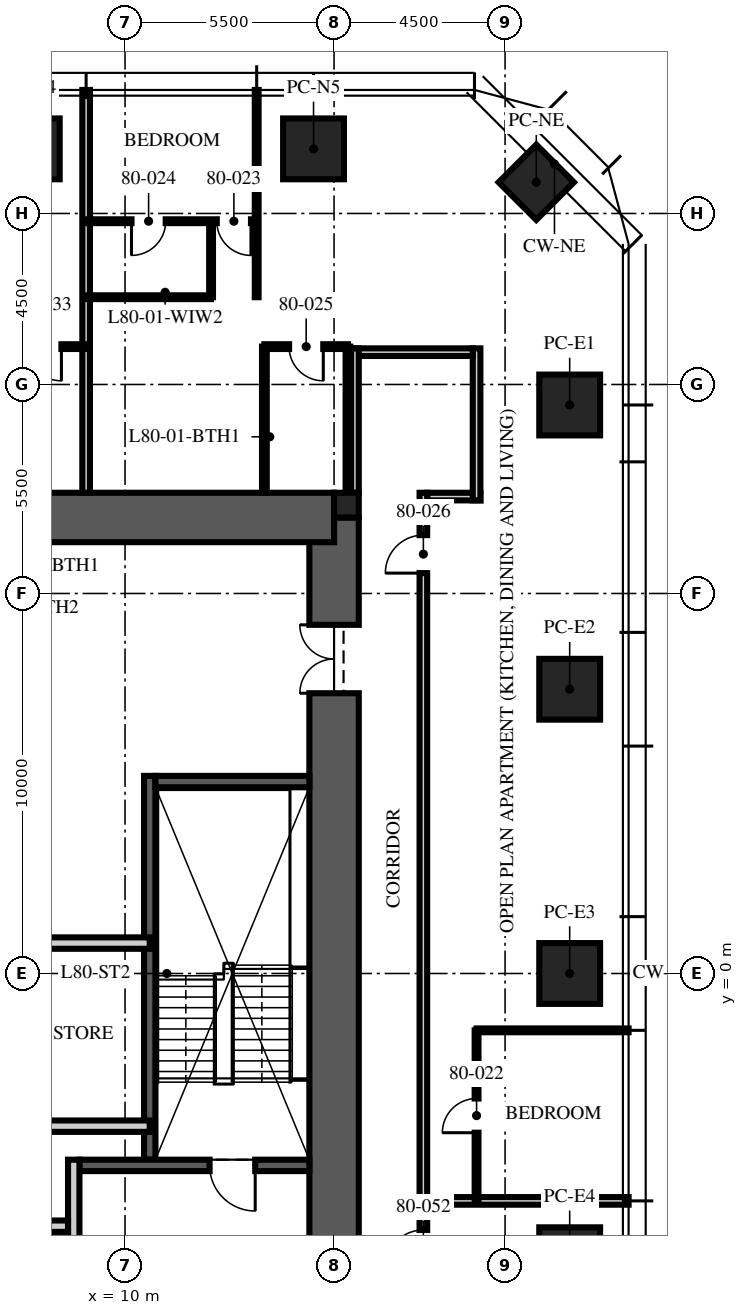
"""IFC4 building model, lengths in metres.
Left out: names, types, materials, properties, quantities, classifications, styles, units other than length and angle.
Written with IfcOpenShell. Run it as: python <this file> out.ifc"""

import sys

from ifc_helpers import new_model, si_unit, direction, frame, frame_2d, origin, origin_2d, place, context, subcontext, project, spatial, rectangle, extrude, element, fill, save


model = new_model("IFC4")
c1 = context("Model", 3, precision=1e-05, world=origin(), true_north=direction((0.0, 1.0)))
c2 = subcontext(c1, "Body", "Model", "MODEL_VIEW")
j1 = project(units=[si_unit("LENGTHUNIT", "METRE"), si_unit("PLANEANGLEUNIT", "RADIAN")], contexts=[c1])
p1 = place(None, origin())
s1 = spatial("IfcSite", under=j1, at=p1, CompositionType="ELEMENT")
p2 = place(p1, origin())
s2 = spatial("IfcBuilding", under=s1, at=p2, CompositionType="ELEMENT")
p3 = place(p2, frame((0.0, 0.0, 319.5)))
s3 = spatial("IfcBuildingStorey", under=s2, at=p3, CompositionType="ELEMENT", Elevation=319.5)
p4 = place(p3, frame((15.5, -12.0, -0.25), z_axis=(0.0, 0.0, 1.0), x_axis=(0.0, 1.0, 0.0)))
e1 = element("IfcWall", 1, at=p4, inside=s3, PredefinedType="SHEAR", context=c2, shape_type="SweptSolid", body=[
    extrude(rectangle(XDim=24.0, YDim=1.3, at=frame_2d((12.0, 0.0))), origin(), (0.0, 0.0, 1.0), 3.75),
])
p5 = place(p4, frame((3.125, 0.0, 0.25)))
e2 = element("IfcOpeningElement", 2, at=p5, cuts=e1, PredefinedType="OPENING", context=c2, shape_type="SweptSolid", body=[
    extrude(rectangle(XDim=1.2, YDim=2.1, at=frame_2d((0.6, 1.05))), frame((0.0, 0.66, 0.0), z_axis=(0.0, -1.0, 0.0), x_axis=(1.0, 0.0, 0.0)), (0.0, 0.0, 1.0), 1.32),
])
p6 = place(p4, frame((19.375, 0.0, 0.25)))
e3 = element("IfcOpeningElement", 3, at=p6, cuts=e1, PredefinedType="OPENING", context=c2, shape_type="SweptSolid", body=[
    extrude(rectangle(XDim=1.8, YDim=2.1, at=frame_2d((0.9, 1.05))), frame((0.0, 0.66, 0.0), z_axis=(0.0, -1.0, 0.0), x_axis=(1.0, 0.0, 0.0)), (0.0, 0.0, 1.0), 1.32),
])
p7 = place(p3, frame((-15.5, 12.0, -0.25), z_axis=(0.0, 0.0, 1.0), x_axis=(1.0, 0.0, 0.0)))
e4 = element("IfcWall", 4, at=p7, inside=s3, PredefinedType="SHEAR", context=c2, shape_type="SweptSolid", body=[
    extrude(rectangle(XDim=31.0, YDim=1.3, at=frame_2d((15.5, 0.0))), origin(), (0.0, 0.0, 1.0), 3.75),
])
p8 = place(p3, frame((15.825, 12.325, -0.25), z_axis=(0.0, 0.0, 1.0), x_axis=(1.0, 0.0, 0.0)))
e5 = element("IfcColumn", 5, at=p8, inside=s3, PredefinedType="COLUMN", context=c2, shape_type="SweptSolid", body=[
    extrude(rectangle(XDim=0.65, YDim=0.65, at=origin_2d()), origin(), (0.0, 0.0, 1.0), 3.75),
])
for number, where, z_axis, x_axis in (
    (6, (7.48, 21.7, 0.0), (0.0, 0.0, 1.0), (1.0, 0.0, 0.0)),
    (7, (14.96, 21.7, 0.0), (0.0, 0.0, 1.0), (1.0, 0.0, 0.0)),
    (8, (21.7, 14.96, 0.0), (0.0, 0.0, 1.0), (0.0, 1.0, 0.0)),
    (9, (21.7, 7.48, 0.0), (0.0, 0.0, 1.0), (0.0, 1.0, 0.0)),
    (10, (21.7, 0.0, 0.0), (0.0, 0.0, 1.0), (0.0, 1.0, 0.0)),
    (11, (21.7, -7.48, 0.0), (0.0, 0.0, 1.0), (0.0, 1.0, 0.0)),
):
    element("IfcColumn", number, at=place(p3, frame(where, z_axis=z_axis, x_axis=x_axis)), inside=s3, PredefinedType="COLUMN", context=c2, shape_type="SweptSolid", body=[
        extrude(rectangle(XDim=1.6, YDim=1.6, at=origin_2d()), origin(), (0.0, 0.0, 1.0), 3.75),
    ])
p9 = place(p3, frame((20.821, 20.821, 0.0), z_axis=(0.0, 0.0, 1.0), x_axis=(0.707106781187, -0.707106781187, 0.0)))
e12 = element("IfcColumn", 12, at=p9, inside=s3, PredefinedType="COLUMN", context=c2, shape_type="SweptSolid", body=[
    extrude(rectangle(XDim=1.4, YDim=1.4, at=origin_2d()), origin(), (0.0, 0.0, 1.0), 3.75),
])
p10 = place(p3, frame((10.65, -4.9, 0.0), z_axis=(0.0, 0.0, 1.0), x_axis=(0.0, 1.0, 0.0)))
e13 = element("IfcWall", 13, at=p10, inside=s3, PredefinedType="SOLIDWALL", context=c2, shape_type="SweptSolid", body=[
    extrude(rectangle(XDim=10.1, YDim=0.3, at=frame_2d((5.05, 0.0))), origin(), (0.0, 0.0, 1.0), 3.5),
])
p11 = place(p3, frame((14.85, -5.05, 0.0), z_axis=(0.0, 0.0, 1.0), x_axis=(-1.0, 0.0, 0.0)))
e14 = element("IfcWall", 14, at=p11, inside=s3, PredefinedType="SOLIDWALL", context=c2, shape_type="SweptSolid", body=[
    extrude(rectangle(XDim=6.05, YDim=0.3, at=frame_2d((3.025, 0.0))), origin(), (0.0, 0.0, 1.0), 3.5),
])
p12 = place(p11, frame((1.425, 0.0, 0.0)))
e15 = element("IfcOpeningElement", 15, at=p12, cuts=e14, PredefinedType="OPENING", context=c2, shape_type="SweptSolid", body=[
    extrude(rectangle(XDim=1.2, YDim=2.1, at=frame_2d((0.6, 1.05))), frame((0.0, 0.16, 0.0), z_axis=(0.0, -1.0, 0.0), x_axis=(1.0, 0.0, 0.0)), (0.0, 0.0, 1.0), 0.32),
])
p13 = place(p3, frame((14.85, 5.05, 0.0), z_axis=(0.0, 0.0, 1.0), x_axis=(-1.0, 0.0, 0.0)))
e16 = element("IfcWall", 16, at=p13, inside=s3, PredefinedType="SOLIDWALL", context=c2, shape_type="SweptSolid", body=[
    extrude(rectangle(XDim=4.05, YDim=0.3, at=frame_2d((2.025, 0.0))), origin(), (0.0, 0.0, 1.0), 3.5),
])
p14 = place(p3, frame((8.65, -11.35, 0.0), z_axis=(0.0, 0.0, 1.0), x_axis=(0.0, 1.0, 0.0)))
e17 = element("IfcWall", 17, at=p14, inside=s3, PredefinedType="PARTITIONING", context=c2, shape_type="SweptSolid", body=[
    extrude(rectangle(XDim=6.45, YDim=0.3, at=frame_2d((3.225, 0.0))), origin(), (0.0, 0.0, 1.0), 3.5),
])
p15 = place(p14, frame((2.6, 0.0, 0.0)))
e18 = element("IfcOpeningElement", 18, at=p15, cuts=e17, PredefinedType="OPENING", context=c2, shape_type="SweptSolid", body=[
    extrude(rectangle(XDim=1.1, YDim=2.1, at=frame_2d((0.55, 1.05))), frame((0.0, 0.16, 0.0), z_axis=(0.0, -1.0, 0.0), x_axis=(1.0, 0.0, 0.0)), (0.0, 0.0, 1.0), 0.32),
])
p16 = place(p3, frame((-8.5, -6.65, 0.0), z_axis=(0.0, 0.0, 1.0), x_axis=(1.0, 0.0, 0.0)))
e19 = element("IfcWall", 19, at=p16, inside=s3, PredefinedType="PARTITIONING", context=c2, shape_type="SweptSolid", body=[
    extrude(rectangle(XDim=17.0, YDim=0.3, at=frame_2d((8.5, 0.0))), origin(), (0.0, 0.0, 1.0), 3.5),
])
p17 = place(p16, frame((7.8, 0.0, 0.0)))
e20 = element("IfcOpeningElement", 20, at=p17, cuts=e19, PredefinedType="OPENING", context=c2, shape_type="SweptSolid", body=[
    extrude(rectangle(XDim=1.3, YDim=2.4, at=frame_2d((0.65, 1.2))), frame((0.0, 0.16, 0.0), z_axis=(0.0, -1.0, 0.0), x_axis=(1.0, 0.0, 0.0)), (0.0, 0.0, 1.0), 0.32),
])
p18 = place(p16, frame((5.65, 0.0, 0.0)))
e21 = element("IfcOpeningElement", 21, at=p18, cuts=e19, PredefinedType="OPENING", context=c2, shape_type="SweptSolid", body=[
    extrude(rectangle(XDim=0.9, YDim=2.1, at=frame_2d((0.45, 1.05))), frame((0.0, 0.16, 0.0), z_axis=(0.0, -1.0, 0.0), x_axis=(1.0, 0.0, 0.0)), (0.0, 0.0, 1.0), 0.32),
])
p19 = place(p16, frame((10.4, 0.0, 0.0)))
e22 = element("IfcOpeningElement", 22, at=p19, cuts=e19, PredefinedType="OPENING", context=c2, shape_type="SweptSolid", body=[
    extrude(rectangle(XDim=0.9, YDim=2.1, at=frame_2d((0.45, 1.05))), frame((0.0, 0.16, 0.0), z_axis=(0.0, -1.0, 0.0), x_axis=(1.0, 0.0, 0.0)), (0.0, 0.0, 1.0), 0.32),
])
p20 = place(p3, frame((-10.65, 0.8, 0.0), z_axis=(0.0, 0.0, 1.0), x_axis=(1.0, 0.0, 0.0)))
e23 = element("IfcWall", 23, at=p20, inside=s3, PredefinedType="PARTITIONING", context=c2, shape_type="SweptSolid", body=[
    extrude(rectangle(XDim=21.3, YDim=0.3, at=frame_2d((10.65, 0.0))), origin(), (0.0, 0.0, 1.0), 3.5),
])
p21 = place(p20, frame((10.05, 0.0, 0.0)))
e24 = element("IfcOpeningElement", 24, at=p21, cuts=e23, PredefinedType="OPENING", context=c2, shape_type="SweptSolid", body=[
    extrude(rectangle(XDim=1.2, YDim=2.1, at=frame_2d((0.6, 1.05))), frame((0.0, 0.16, 0.0), z_axis=(0.0, -1.0, 0.0), x_axis=(1.0, 0.0, 0.0)), (0.0, 0.0, 1.0), 0.32),
])
p22 = place(p20, frame((0.793, 0.0, 0.0)))
e25 = element("IfcOpeningElement", 25, at=p22, cuts=e23, PredefinedType="OPENING", context=c2, shape_type="SweptSolid", body=[
    extrude(rectangle(XDim=0.9, YDim=2.1, at=frame_2d((0.45, 1.05))), frame((0.0, 0.16, 0.0), z_axis=(0.0, -1.0, 0.0), x_axis=(1.0, 0.0, 0.0)), (0.0, 0.0, 1.0), 0.32),
])
p23 = place(p3, frame((10.65, -4.018, 0.0), z_axis=(0.0, 0.0, 1.0), x_axis=(-1.0, 0.0, 0.0)))
e26 = element("IfcWall", 26, at=p23, inside=s3, PredefinedType="PARTITIONING", context=c2, shape_type="SweptSolid", body=[
    extrude(rectangle(XDim=6.45, YDim=0.3, at=frame_2d((3.225, 0.0))), origin(), (0.0, 0.0, 1.0), 3.5),
])
p24 = place(p3, frame((17.95, 12.55, 0.0), z_axis=(0.0, 0.0, 1.0), x_axis=(1.0, 0.0, 0.0)))
e27 = element("IfcWall", 27, at=p24, inside=s3, PredefinedType="PARTITIONING", context=c2, shape_type="SweptSolid", body=[
    extrude(rectangle(XDim=1.4, YDim=0.2, at=frame_2d((0.7, 0.0))), origin(), (0.0, 0.0, 1.0), 3.5),
])
p25 = place(p3, frame((19.25, 12.45, 0.0), z_axis=(0.0, 0.0, 1.0), x_axis=(0.0, 1.0, 0.0)))
e28 = element("IfcWall", 28, at=p25, inside=s3, PredefinedType="PARTITIONING", context=c2, shape_type="SweptSolid", body=[
    extrude(rectangle(XDim=4.0, YDim=0.2, at=frame_2d((2.0, 0.0))), origin(), (0.0, 0.0, 1.0), 2.9),
])
p26 = place(p3, frame((19.15, 16.35, 0.0), z_axis=(0.0, 0.0, 1.0), x_axis=(-1.0, 0.0, 0.0)))
e29 = element("IfcWall", 29, at=p26, inside=s3, PredefinedType="PARTITIONING", context=c2, shape_type="SweptSolid", body=[
    extrude(rectangle(XDim=3.2, YDim=0.2, at=frame_2d((1.6, 0.0))), origin(), (0.0, 0.0, 1.0), 2.6),
])
p27 = place(p3, frame((16.05, 16.45, 0.0), z_axis=(0.0, 0.0, 1.0), x_axis=(0.0, -1.0, 0.0)))
e30 = element("IfcWall", 30, at=p27, inside=s3, PredefinedType="PARTITIONING", context=c2, shape_type="SweptSolid", body=[
    extrude(rectangle(XDim=3.8, YDim=0.2, at=frame_2d((1.9, 0.0))), origin(), (0.0, 0.0, 1.0), 2.6),
])
p28 = place(p3, frame((17.95, -5.984, 0.0), z_axis=(0.0, 0.0, 1.0), x_axis=(1.0, 0.0, 0.0)))
e31 = element("IfcWall", 31, at=p28, inside=s3, PredefinedType="PARTITIONING", context=c2, shape_type="SweptSolid", body=[
    extrude(rectangle(XDim=5.3, YDim=0.2, at=frame_2d((2.65, 0.0))), origin(), (0.0, 0.0, 1.0), 3.01),
])
p29 = place(p3, frame((19.25, -1.496, 0.0), z_axis=(0.0, 0.0, 1.0), x_axis=(1.0, 0.0, 0.0)))
e32 = element("IfcWall", 32, at=p29, inside=s3, PredefinedType="PARTITIONING", context=c2, shape_type="SweptSolid", body=[
    extrude(rectangle(XDim=4.0, YDim=0.1, at=frame_2d((2.0, 0.0))), origin(), (0.0, 0.0, 1.0), 3.01),
])
p30 = place(p3, frame((13.464, 17.796, 0.0), z_axis=(0.0, 0.0, 1.0), x_axis=(0.0, 1.0, 0.0)))
e33 = element("IfcWall", 33, at=p30, inside=s3, PredefinedType="PARTITIONING", context=c2, shape_type="SweptSolid", body=[
    extrude(rectangle(XDim=5.454, YDim=0.1, at=frame_2d((2.727, 0.0))), origin(), (0.0, 0.0, 1.0), 3.01),
])
p31 = place(p3, frame((8.976, 12.65, 0.0), z_axis=(0.0, 0.0, 1.0), x_axis=(0.0, 1.0, 0.0)))
e34 = element("IfcWall", 34, at=p31, inside=s3, PredefinedType="PARTITIONING", context=c2, shape_type="SweptSolid", body=[
    extrude(rectangle(XDim=10.6, YDim=0.2, at=frame_2d((5.3, 0.0))), origin(), (0.0, 0.0, 1.0), 3.01),
])
p32 = place(p3, frame((19.25, -5.984, 0.0), z_axis=(0.0, 0.0, 1.0), x_axis=(0.0, 1.0, 0.0)))
e35 = element("IfcWall", 35, at=p32, inside=s3, PredefinedType="PARTITIONING", context=c2, shape_type="SweptSolid", body=[
    extrude(rectangle(XDim=4.488, YDim=0.1, at=frame_2d((2.244, 0.0))), origin(), (0.0, 0.0, 1.0), 2.91),
])
p33 = place(p32, frame((1.794, 0.0, 0.0)))
e36 = element("IfcOpeningElement", 36, at=p33, cuts=e35, PredefinedType="OPENING", context=c2, shape_type="SweptSolid", body=[
    extrude(rectangle(XDim=0.9, YDim=2.1, at=frame_2d((0.45, 1.05))), frame((0.0, 0.06, 0.0), z_axis=(0.0, -1.0, 0.0), x_axis=(1.0, 0.0, 0.0)), (0.0, 0.0, 1.0), 0.12),
])
p34 = place(p3, frame((13.464, 19.796, 0.0), z_axis=(0.0, 0.0, 1.0), x_axis=(-1.0, 0.0, 0.0)))
e37 = element("IfcWall", 37, at=p34, inside=s3, PredefinedType="PARTITIONING", context=c2, shape_type="SweptSolid", body=[
    extrude(rectangle(XDim=4.488, YDim=0.1, at=frame_2d((2.244, 0.0))), origin(), (0.0, 0.0, 1.0), 2.91),
])
p35 = place(p34, frame((0.15, 0.0, 0.0)))
e38 = element("IfcOpeningElement", 38, at=p35, cuts=e37, PredefinedType="OPENING", context=c2, shape_type="SweptSolid", body=[
    extrude(rectangle(XDim=0.9, YDim=2.1, at=frame_2d((0.45, 1.05))), frame((0.0, 0.06, 0.0), z_axis=(0.0, -1.0, 0.0), x_axis=(1.0, 0.0, 0.0)), (0.0, 0.0, 1.0), 0.12),
])
p36 = place(p34, frame((2.394, 0.0, 0.0)))
e39 = element("IfcOpeningElement", 39, at=p36, cuts=e37, PredefinedType="OPENING", context=c2, shape_type="SweptSolid", body=[
    extrude(rectangle(XDim=0.9, YDim=2.1, at=frame_2d((0.45, 1.05))), frame((0.0, 0.06, 0.0), z_axis=(0.0, -1.0, 0.0), x_axis=(1.0, 0.0, 0.0)), (0.0, 0.0, 1.0), 0.12),
])
p37 = place(p3, frame((12.264, 17.796, 0.0), z_axis=(0.0, 0.0, 1.0), x_axis=(0.0, 1.0, 0.0)))
e40 = element("IfcWall", 40, at=p37, inside=s3, PredefinedType="PARTITIONING", context=c2, shape_type="SweptSolid", body=[
    extrude(rectangle(XDim=2.0, YDim=0.1, at=frame_2d((1.0, 0.0))), origin(), (0.0, 0.0, 1.0), 3.5),
])
p38 = place(p3, frame((12.264, 17.796, 0.0), z_axis=(0.0, 0.0, 1.0), x_axis=(-1.0, 0.0, 0.0)))
e41 = element("IfcWall", 41, at=p38, inside=s3, PredefinedType="PARTITIONING", context=c2, shape_type="SweptSolid", body=[
    extrude(rectangle(XDim=3.288, YDim=0.1, at=frame_2d((1.644, 0.0))), origin(), (0.0, 0.0, 1.0), 2.91),
])
p39 = place(p3, frame((15.866, 16.496, 0.0), z_axis=(0.0, 0.0, 1.0), x_axis=(-1.0, 0.0, 0.0)))
e42 = element("IfcWall", 42, at=p39, inside=s3, PredefinedType="PARTITIONING", context=c2, shape_type="SweptSolid", body=[
    extrude(rectangle(XDim=2.2, YDim=0.125, at=frame_2d((1.1, 0.0))), origin(), (0.0, 0.0, 1.0), 2.9),
])
p40 = place(p39, frame((0.65, 0.0, 0.0)))
e43 = element("IfcOpeningElement", 43, at=p40, cuts=e42, PredefinedType="OPENING", context=c2, shape_type="SweptSolid", body=[
    extrude(rectangle(XDim=0.9, YDim=2.1, at=frame_2d((0.45, 1.05))), frame((0.0, 0.073, 0.0), z_axis=(0.0, -1.0, 0.0), x_axis=(1.0, 0.0, 0.0)), (0.0, 0.0, 1.0), 0.145),
])
p41 = place(p3, frame((15.866, 12.65, 0.0), z_axis=(0.0, 0.0, 1.0), x_axis=(0.0, 1.0, 0.0)))
e44 = element("IfcWall", 44, at=p41, inside=s3, PredefinedType="PARTITIONING", context=c2, shape_type="SweptSolid", body=[
    extrude(rectangle(XDim=3.846, YDim=0.125, at=frame_2d((1.923, 0.0))), origin(), (0.0, 0.0, 1.0), 2.6),
])
p42 = place(p3, frame((13.667, 12.65, 0.0), z_axis=(0.0, 0.0, 1.0), x_axis=(0.0, 1.0, 0.0)))
e45 = element("IfcWall", 45, at=p42, inside=s3, PredefinedType="PARTITIONING", context=c2, shape_type="SweptSolid", body=[
    extrude(rectangle(XDim=3.846, YDim=0.125, at=frame_2d((1.923, 0.0))), origin(), (0.0, 0.0, 1.0), 3.5),
])
p43 = place(p3, frame((8.976, 16.496, 0.0), z_axis=(0.0, 0.0, 1.0), x_axis=(-1.0, 0.0, 0.0)))
e46 = element("IfcWall", 46, at=p43, inside=s3, PredefinedType="PARTITIONING", context=c2, shape_type="SweptSolid", body=[
    extrude(rectangle(XDim=7.7, YDim=0.125, at=frame_2d((3.85, 0.0))), origin(), (0.0, 0.0, 1.0), 2.9),
])
p44 = place(p43, frame((0.65, 0.0, 0.0)))
e47 = element("IfcOpeningElement", 47, at=p44, cuts=e46, PredefinedType="OPENING", context=c2, shape_type="SweptSolid", body=[
    extrude(rectangle(XDim=0.9, YDim=2.1, at=frame_2d((0.45, 1.05))), frame((0.0, 0.073, 0.0), z_axis=(0.0, -1.0, 0.0), x_axis=(1.0, 0.0, 0.0)), (0.0, 0.0, 1.0), 0.145),
])
p45 = place(p43, frame((2.85, 0.0, 0.0)))
e48 = element("IfcOpeningElement", 48, at=p45, cuts=e46, PredefinedType="OPENING", context=c2, shape_type="SweptSolid", body=[
    extrude(rectangle(XDim=0.9, YDim=2.1, at=frame_2d((0.45, 1.05))), frame((0.0, 0.073, 0.0), z_axis=(0.0, -1.0, 0.0), x_axis=(1.0, 0.0, 0.0)), (0.0, 0.0, 1.0), 0.145),
])
p46 = place(p43, frame((4.85, 0.0, 0.0)))
e49 = element("IfcOpeningElement", 49, at=p46, cuts=e46, PredefinedType="OPENING", context=c2, shape_type="SweptSolid", body=[
    extrude(rectangle(XDim=0.9, YDim=2.1, at=frame_2d((0.45, 1.05))), frame((0.0, 0.073, 0.0), z_axis=(0.0, -1.0, 0.0), x_axis=(1.0, 0.0, 0.0)), (0.0, 0.0, 1.0), 0.145),
])
p47 = place(p43, frame((6.5, 0.0, 0.0)))
e50 = element("IfcOpeningElement", 50, at=p47, cuts=e46, PredefinedType="OPENING", context=c2, shape_type="SweptSolid", body=[
    extrude(rectangle(XDim=0.9, YDim=2.1, at=frame_2d((0.45, 1.05))), frame((0.0, 0.073, 0.0), z_axis=(0.0, -1.0, 0.0), x_axis=(1.0, 0.0, 0.0)), (0.0, 0.0, 1.0), 0.145),
])
p48 = place(p3, frame((17.85, -12.85, 0.0), z_axis=(0.0, 0.0, 1.0), x_axis=(0.0, 1.0, 0.0)))
e51 = element("IfcWall", 51, at=p48, inside=s3, PredefinedType="PARTITIONING", context=c2, shape_type="SweptSolid", body=[
    extrude(rectangle(XDim=25.5, YDim=0.2, at=frame_2d((12.75, 0.0))), origin(), (0.0, 0.0, 1.0), 2.9),
])
p49 = place(p48, frame((23.386, 0.0, 0.0)))
e52 = element("IfcOpeningElement", 52, at=p49, cuts=e51, PredefinedType="OPENING", context=c2, shape_type="SweptSolid", body=[
    extrude(rectangle(XDim=1.0, YDim=2.2, at=frame_2d((0.5, 1.1))), frame((0.0, 0.11, 0.0), z_axis=(0.0, -1.0, 0.0), x_axis=(1.0, 0.0, 0.0)), (0.0, 0.0, 1.0), 0.22),
])
p50 = place(p48, frame((5.1, 0.0, 0.0)))
e53 = element("IfcOpeningElement", 53, at=p50, cuts=e51, PredefinedType="OPENING", context=c2, shape_type="SweptSolid", body=[
    extrude(rectangle(XDim=1.0, YDim=2.2, at=frame_2d((0.5, 1.1))), frame((0.0, 0.11, 0.0), z_axis=(0.0, -1.0, 0.0), x_axis=(1.0, 0.0, 0.0)), (0.0, 0.0, 1.0), 0.22),
])
p51 = place(p12, origin())
e54 = element("IfcDoor", 54, at=p51, inside=s3, OperationType="SINGLE_SWING_LEFT", PredefinedType="DOOR", context=c2, shape_type="SweptSolid", body=[
    extrude(rectangle(XDim=1.2, YDim=2.1, at=frame_2d((0.6, 1.05))), frame((0.0, 0.025, 0.0), z_axis=(0.0, -1.0, 0.0), x_axis=(1.0, 0.0, 0.0)), (0.0, 0.0, 1.0), 0.05),
])
fill(e15, e54)
p52 = place(p6, origin())
e55 = element("IfcDoor", 55, at=p52, inside=s3, OperationType="DOUBLE_DOOR_SINGLE_SWING", PredefinedType="DOOR", context=c2, shape_type="SweptSolid", body=[
    extrude(rectangle(XDim=1.8, YDim=2.1, at=frame_2d((0.9, 1.05))), frame((0.0, 0.025, 0.0), z_axis=(0.0, -1.0, 0.0), x_axis=(1.0, 0.0, 0.0)), (0.0, 0.0, 1.0), 0.05),
])
fill(e3, e55)
p53 = place(p33, origin())
e56 = element("IfcDoor", 56, at=p53, inside=s3, OperationType="SINGLE_SWING_LEFT", PredefinedType="DOOR", context=c2, shape_type="SweptSolid", body=[
    extrude(rectangle(XDim=0.9, YDim=2.1, at=frame_2d((0.45, 1.05))), frame((0.0, 0.025, 0.0), z_axis=(0.0, -1.0, 0.0), x_axis=(1.0, 0.0, 0.0)), (0.0, 0.0, 1.0), 0.05),
])
fill(e36, e56)
p54 = place(p35, origin())
e57 = element("IfcDoor", 57, at=p54, inside=s3, OperationType="SINGLE_SWING_LEFT", PredefinedType="DOOR", context=c2, shape_type="SweptSolid", body=[
    extrude(rectangle(XDim=0.9, YDim=2.1, at=frame_2d((0.45, 1.05))), frame((0.0, 0.025, 0.0), z_axis=(0.0, -1.0, 0.0), x_axis=(1.0, 0.0, 0.0)), (0.0, 0.0, 1.0), 0.05),
])
fill(e38, e57)
p55 = place(p36, origin())
e58 = element("IfcDoor", 58, at=p55, inside=s3, OperationType="SINGLE_SWING_RIGHT", PredefinedType="DOOR", context=c2, shape_type="SweptSolid", body=[
    extrude(rectangle(XDim=0.9, YDim=2.1, at=frame_2d((0.45, 1.05))), frame((0.0, 0.025, 0.0), z_axis=(0.0, -1.0, 0.0), x_axis=(1.0, 0.0, 0.0)), (0.0, 0.0, 1.0), 0.05),
])
fill(e39, e58)
p56 = place(p40, origin())
e59 = element("IfcDoor", 59, at=p56, inside=s3, OperationType="SINGLE_SWING_LEFT", PredefinedType="DOOR", context=c2, shape_type="SweptSolid", body=[
    extrude(rectangle(XDim=0.9, YDim=2.1, at=frame_2d((0.45, 1.05))), frame((0.0, 0.025, 0.0), z_axis=(0.0, -1.0, 0.0), x_axis=(1.0, 0.0, 0.0)), (0.0, 0.0, 1.0), 0.05),
])
fill(e43, e59)
p57 = place(p49, origin())
e60 = element("IfcDoor", 60, at=p57, inside=s3, OperationType="SINGLE_SWING_LEFT", PredefinedType="DOOR", context=c2, shape_type="SweptSolid", body=[
    extrude(rectangle(XDim=1.0, YDim=2.2, at=frame_2d((0.5, 1.1))), frame((0.0, 0.025, 0.0), z_axis=(0.0, -1.0, 0.0), x_axis=(1.0, 0.0, 0.0)), (0.0, 0.0, 1.0), 0.05),
])
fill(e52, e60)
p58 = place(p44, origin())
e61 = element("IfcDoor", 61, at=p58, inside=s3, OperationType="SINGLE_SWING_LEFT", PredefinedType="DOOR", context=c2, shape_type="SweptSolid", body=[
    extrude(rectangle(XDim=0.9, YDim=2.1, at=frame_2d((0.45, 1.05))), frame((0.0, 0.025, 0.0), z_axis=(0.0, -1.0, 0.0), x_axis=(1.0, 0.0, 0.0)), (0.0, 0.0, 1.0), 0.05),
])
fill(e47, e61)
p59 = place(p50, origin())
e62 = element("IfcDoor", 62, at=p59, inside=s3, OperationType="SINGLE_SWING_LEFT", PredefinedType="DOOR", context=c2, shape_type="SweptSolid", body=[
    extrude(rectangle(XDim=1.0, YDim=2.2, at=frame_2d((0.5, 1.1))), frame((0.0, 0.025, 0.0), z_axis=(0.0, -1.0, 0.0), x_axis=(1.0, 0.0, 0.0)), (0.0, 0.0, 1.0), 0.05),
])
fill(e53, e62)
save(model, sys.argv[1])
